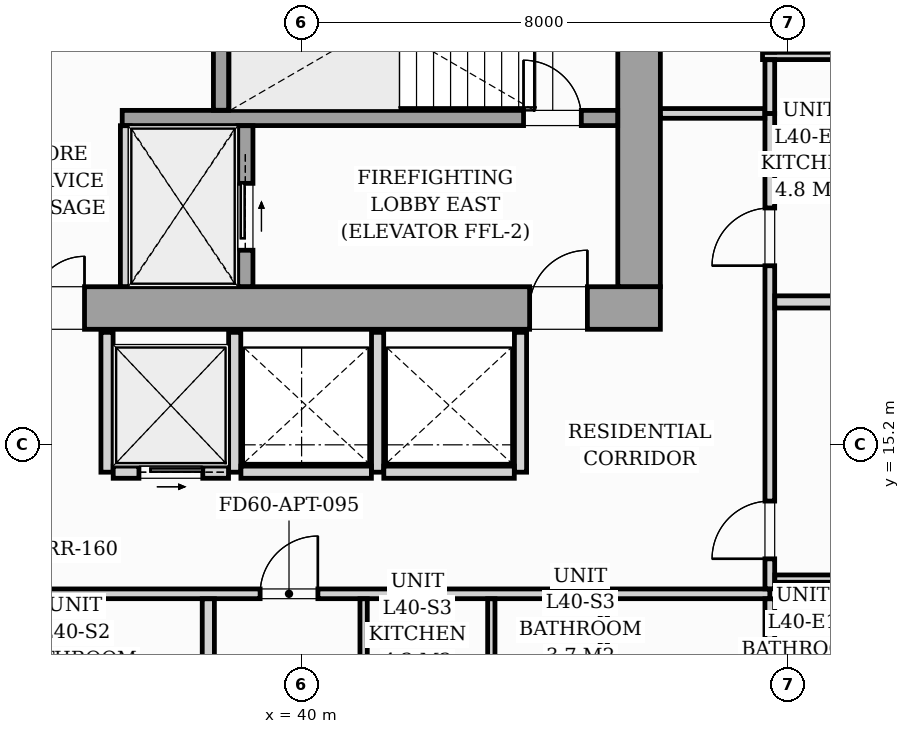
"""IFC4 building model, lengths in metres.
Left out: names, types, materials, properties, quantities, classifications, styles, units other than length and angle.
Written with IfcOpenShell. Run it as: python <this file> out.ifc"""

import sys

from ifc_helpers import new_model, si_unit, direction, frame, frame_2d, origin, origin_2d, place, context, subcontext, project, spatial, rectangle, i_section, extrude, source, transform, mapped, element, fill, save


model = new_model("IFC4")
c1 = context("Model", 3, precision=1e-05, world=origin(), true_north=direction((0.0, 1.0)))
c2 = subcontext(c1, "Body", "Model", "MODEL_VIEW")
j1 = project(units=[si_unit("LENGTHUNIT", "METRE"), si_unit("PLANEANGLEUNIT", "RADIAN")], contexts=[c1])
p1 = place(None, origin())
s1 = spatial("IfcSite", under=j1, at=p1, CompositionType="ELEMENT")
p2 = place(p1, origin())
s2 = spatial("IfcBuilding", under=s1, at=p2, CompositionType="ELEMENT")
p3 = place(p2, frame((0.0, 0.0, 140.6)))
s3 = spatial("IfcBuildingStorey", under=s2, at=p3, CompositionType="ELEMENT", Elevation=140.6)
m1 = source(origin(), c2, "Body", "SweptSolid", [
    extrude(i_section(OverallWidth=0.421, OverallDepth=0.465, WebThickness=0.045, FlangeThickness=0.073, FilletRadius=0.018, at=origin_2d()), origin(), (0.0, 0.0, 1.0), 3.196),
])
for number, where, z_axis, x_axis in (
    (1, (38.88, 17.4, 0.002), (0.0, 0.0, 1.0), (1.0, 0.0, 0.0)),
    (2, (45.6, 17.4, 0.002), (0.0, 0.0, 1.0), (1.0, 0.0, 0.0)),
):
    element("IfcColumn", number, at=place(p3, frame(where, z_axis=z_axis, x_axis=x_axis)), inside=s3, PredefinedType="PILASTER", context=c2, shape_type="MappedRepresentation", body=[
        mapped(m1, transform((0.0, 0.0, 0.0), scale=1.0)),
    ])
p4 = place(p3, frame((26.1, 17.45, 0.0), z_axis=(0.0, 0.0, 1.0), x_axis=(1.0, 0.0, 0.0)))
e3 = element("IfcWall", 3, at=p4, inside=s3, PredefinedType="SHEAR", context=c2, shape_type="SweptSolid", body=[
    extrude(rectangle(XDim=19.8, YDim=0.7, at=frame_2d((9.9, 0.0))), origin(), (0.0, 0.0, 1.0), 3.2),
])
p5 = place(p4, frame((1.05, 0.0, 0.0)))
e4 = element("IfcOpeningElement", 4, at=p5, cuts=e3, PredefinedType="OPENING", context=c2, shape_type="SweptSolid", body=[
    extrude(rectangle(XDim=0.95, YDim=2.06, at=frame_2d((0.475, 1.03))), frame((0.0, 0.36, 0.0), z_axis=(0.0, -1.0, 0.0), x_axis=(1.0, 0.0, 0.0)), (0.0, 0.0, 1.0), 0.72),
])
p6 = place(p4, frame((9.48, 0.0, 0.0)))
e5 = element("IfcOpeningElement", 5, at=p6, cuts=e3, PredefinedType="OPENING", context=c2, shape_type="SweptSolid", body=[
    extrude(rectangle(XDim=0.85, YDim=2.0, at=frame_2d((0.425, 1.0))), frame((0.0, 0.36, 0.0), z_axis=(0.0, -1.0, 0.0), x_axis=(1.0, 0.0, 0.0)), (0.0, 0.0, 1.0), 0.72),
])
p7 = place(p4, frame((17.65, 0.0, 0.0)))
e6 = element("IfcOpeningElement", 6, at=p7, cuts=e3, PredefinedType="OPENING", context=c2, shape_type="SweptSolid", body=[
    extrude(rectangle(XDim=0.95, YDim=2.06, at=frame_2d((0.475, 1.03))), frame((0.0, 0.36, 0.0), z_axis=(0.0, -1.0, 0.0), x_axis=(1.0, 0.0, 0.0)), (0.0, 0.0, 1.0), 0.72),
])
p8 = place(p3, frame((45.55, 17.802, 0.0), z_axis=(0.0, 0.0, 1.0), x_axis=(0.0, 1.0, 0.0)))
e7 = element("IfcWall", 7, at=p8, inside=s3, PredefinedType="SHEAR", context=c2, shape_type="SweptSolid", body=[
    extrude(rectangle(XDim=5.796, YDim=0.7, at=frame_2d((2.898, 0.0))), origin(), (0.0, 0.0, 1.0), 3.2),
])
p9 = place(p3, frame((37.05, 20.575, 0.0), z_axis=(0.0, 0.0, 1.0), x_axis=(1.0, 0.0, 0.0)))
e8 = element("IfcWall", 8, at=p9, inside=s3, PredefinedType="SOLIDWALL", context=c2, shape_type="SweptSolid", body=[
    extrude(rectangle(XDim=8.148, YDim=0.25, at=frame_2d((4.074, 0.0))), origin(), (0.0, 0.0, 1.0), 3.2),
])
p10 = place(p9, frame((6.6, 0.0, 0.0)))
e9 = element("IfcOpeningElement", 9, at=p10, cuts=e8, PredefinedType="OPENING", context=c2, shape_type="SweptSolid", body=[
    extrude(rectangle(XDim=0.95, YDim=2.06, at=frame_2d((0.475, 1.03))), frame((0.0, 0.135, 0.0), z_axis=(0.0, -1.0, 0.0), x_axis=(1.0, 0.0, 0.0)), (0.0, 0.0, 1.0), 0.27),
])
p11 = place(p3, frame((38.675, 20.702, 0.0), z_axis=(0.0, 0.0, 1.0), x_axis=(0.0, 1.0, 0.0)))
e10 = element("IfcWall", 10, at=p11, inside=s3, PredefinedType="SOLIDWALL", context=c2, shape_type="SweptSolid", body=[
    extrude(rectangle(XDim=2.896, YDim=0.25, at=frame_2d((1.448, 0.0))), origin(), (0.0, 0.0, 1.0), 3.2),
])
p12 = place(p3, frame((37.1, 17.802, 0.0), z_axis=(0.0, 0.0, 1.0), x_axis=(0.0, 1.0, 0.0)))
e11 = element("IfcWall", 11, at=p12, inside=s3, PredefinedType="PARTITIONING", context=c2, shape_type="SweptSolid", body=[
    extrude(rectangle(XDim=2.646, YDim=0.16, at=frame_2d((1.323, 0.0))), origin(), (0.0, 0.0, 1.0), 2.94),
])
p13 = place(p3, frame((39.075, 17.802, 0.0), z_axis=(0.0, 0.0, 1.0), x_axis=(0.0, 1.0, 0.0)))
e12 = element("IfcWall", 12, at=p13, inside=s3, PredefinedType="SOLIDWALL", context=c2, shape_type="SweptSolid", body=[
    extrude(rectangle(XDim=2.646, YDim=0.25, at=frame_2d((1.323, 0.0))), origin(), (0.0, 0.0, 1.0), 3.2),
])
p14 = place(p13, frame((0.598, 0.0, 0.0)))
e13 = element("IfcOpeningElement", 13, at=p14, cuts=e12, PredefinedType="OPENING", context=c2, shape_type="SweptSolid", body=[
    extrude(rectangle(XDim=1.1, YDim=2.08, at=frame_2d((0.55, 1.04))), frame((0.0, 0.135, 0.0), z_axis=(0.0, -1.0, 0.0), x_axis=(1.0, 0.0, 0.0)), (0.0, 0.0, 1.0), 0.27),
])
for number, where, z_axis, x_axis in (
    (14, (36.8, 14.75, 0.0), (0.0, 0.0, 1.0), (0.0, 1.0, 0.0)),
    (15, (38.9, 14.75, 0.0), (0.0, 0.0, 1.0), (0.0, 1.0, 0.0)),
):
    element("IfcWall", number, at=place(p3, frame(where, z_axis=z_axis, x_axis=x_axis)), inside=s3, PredefinedType="PARTITIONING", context=c2, shape_type="SweptSolid", body=[
        extrude(rectangle(XDim=2.3, YDim=0.2, at=frame_2d((1.15, 0.0))), origin(), (0.0, 0.0, 1.0), 2.94),
    ])
p15 = place(p3, frame((36.902, 14.75, 0.0), z_axis=(0.0, 0.0, 1.0), x_axis=(1.0, 0.0, 0.0)))
e16 = element("IfcWall", 16, at=p15, inside=s3, PredefinedType="PARTITIONING", context=c2, shape_type="SweptSolid", body=[
    extrude(rectangle(XDim=1.896, YDim=0.2, at=frame_2d((0.948, 0.0))), origin(), (0.0, 0.0, 1.0), 2.94),
])
p16 = place(p15, frame((0.423, 0.0, 0.0)))
e17 = element("IfcOpeningElement", 17, at=p16, cuts=e16, PredefinedType="OPENING", context=c2, shape_type="SweptSolid", body=[
    extrude(rectangle(XDim=1.05, YDim=2.08, at=frame_2d((0.525, 1.04))), frame((0.0, 0.11, 0.0), z_axis=(0.0, -1.0, 0.0), x_axis=(1.0, 0.0, 0.0)), (0.0, 0.0, 1.0), 0.22),
])
for number, where, z_axis, x_axis in (
    (18, (41.25, 14.75, 0.0), (0.0, 0.0, 1.0), (0.0, 1.0, 0.0)),
    (19, (43.6, 14.75, 0.0), (0.0, 0.0, 1.0), (0.0, 1.0, 0.0)),
):
    element("IfcWall", number, at=place(p3, frame(where, z_axis=z_axis, x_axis=x_axis)), inside=s3, PredefinedType="PARTITIONING", context=c2, shape_type="SweptSolid", body=[
        extrude(rectangle(XDim=2.3, YDim=0.2, at=frame_2d((1.15, 0.0))), origin(), (0.0, 0.0, 1.0), 2.94),
    ])
for number, where, z_axis, x_axis in (
    (20, (39.002, 14.75, 0.0), (0.0, 0.0, 1.0), (1.0, 0.0, 0.0)),
    (21, (41.352, 14.75, 0.0), (0.0, 0.0, 1.0), (1.0, 0.0, 0.0)),
):
    element("IfcWall", number, at=place(p3, frame(where, z_axis=z_axis, x_axis=x_axis)), inside=s3, PredefinedType="PARTITIONING", context=c2, shape_type="SweptSolid", body=[
        extrude(rectangle(XDim=2.146, YDim=0.2, at=frame_2d((1.073, 0.0))), origin(), (0.0, 0.0, 1.0), 2.94),
    ])
p17 = place(p3, frame((22.05, 12.75, 0.0), z_axis=(0.0, 0.0, 1.0), x_axis=(1.0, 0.0, 0.0)))
e22 = element("IfcWall", 22, at=p17, inside=s3, PredefinedType="PARTITIONING", context=c2, shape_type="SweptSolid", body=[
    extrude(rectangle(XDim=25.65, YDim=0.16, at=frame_2d((12.825, 0.0))), origin(), (0.0, 0.0, 1.0), 2.94),
])
p18 = place(p17, frame((1.312, 0.0, 0.0)))
e23 = element("IfcOpeningElement", 23, at=p18, cuts=e22, PredefinedType="OPENING", context=c2, shape_type="SweptSolid", body=[
    extrude(rectangle(XDim=0.95, YDim=2.06, at=frame_2d((0.475, 1.03))), frame((0.0, 0.09, 0.0), z_axis=(0.0, -1.0, 0.0), x_axis=(1.0, 0.0, 0.0)), (0.0, 0.0, 1.0), 0.18),
])
p19 = place(p17, frame((8.281, 0.0, 0.0)))
e24 = element("IfcOpeningElement", 24, at=p19, cuts=e22, PredefinedType="OPENING", context=c2, shape_type="SweptSolid", body=[
    extrude(rectangle(XDim=0.95, YDim=2.06, at=frame_2d((0.475, 1.03))), frame((0.0, 0.09, 0.0), z_axis=(0.0, -1.0, 0.0), x_axis=(1.0, 0.0, 0.0)), (0.0, 0.0, 1.0), 0.18),
])
p20 = place(p17, frame((17.268, 0.0, 0.0)))
e25 = element("IfcOpeningElement", 25, at=p20, cuts=e22, PredefinedType="OPENING", context=c2, shape_type="SweptSolid", body=[
    extrude(rectangle(XDim=0.95, YDim=2.06, at=frame_2d((0.475, 1.03))), frame((0.0, 0.09, 0.0), z_axis=(0.0, -1.0, 0.0), x_axis=(1.0, 0.0, 0.0)), (0.0, 0.0, 1.0), 0.18),
])
p21 = place(p3, frame((47.7, 5.783, 0.0), z_axis=(0.0, 0.0, 1.0), x_axis=(0.0, 1.0, 0.0)))
e26 = element("IfcWall", 26, at=p21, inside=s3, PredefinedType="PARTITIONING", context=c2, shape_type="SweptSolid", body=[
    extrude(rectangle(XDim=6.885, YDim=0.16, at=frame_2d((3.442, 0.0))), origin(), (0.0, 0.0, 1.0), 2.94),
])
p22 = place(p3, frame((47.7, 12.832, 0.0), z_axis=(0.0, 0.0, 1.0), x_axis=(0.0, 1.0, 0.0)))
e27 = element("IfcWall", 27, at=p22, inside=s3, PredefinedType="PARTITIONING", context=c2, shape_type="SweptSolid", body=[
    extrude(rectangle(XDim=7.818, YDim=0.16, at=frame_2d((3.909, 0.0))), origin(), (0.0, 0.0, 1.0), 2.94),
])
p23 = place(p22, frame((0.493, 0.0, 0.0)))
e28 = element("IfcOpeningElement", 28, at=p23, cuts=e27, PredefinedType="OPENING", context=c2, shape_type="SweptSolid", body=[
    extrude(rectangle(XDim=0.95, YDim=2.06, at=frame_2d((0.475, 1.03))), frame((0.0, 0.09, 0.0), z_axis=(0.0, -1.0, 0.0), x_axis=(1.0, 0.0, 0.0)), (0.0, 0.0, 1.0), 0.18),
])
p24 = place(p22, frame((5.313, 0.0, 0.0)))
e29 = element("IfcOpeningElement", 29, at=p24, cuts=e27, PredefinedType="OPENING", context=c2, shape_type="SweptSolid", body=[
    extrude(rectangle(XDim=0.95, YDim=2.06, at=frame_2d((0.475, 1.03))), frame((0.0, 0.09, 0.0), z_axis=(0.0, -1.0, 0.0), x_axis=(1.0, 0.0, 0.0)), (0.0, 0.0, 1.0), 0.18),
])
p25 = place(p3, frame((45.902, 20.65, 0.0), z_axis=(0.0, 0.0, 1.0), x_axis=(1.0, 0.0, 0.0)))
e30 = element("IfcWall", 30, at=p25, inside=s3, PredefinedType="PARTITIONING", context=c2, shape_type="SweptSolid", body=[
    extrude(rectangle(XDim=1.716, YDim=0.16, at=frame_2d((0.858, 0.0))), origin(), (0.0, 0.0, 1.0), 2.94),
])
p26 = place(p3, frame((38.466, 6.49, 0.0), z_axis=(0.0, 0.0, 1.0), x_axis=(0.0, 1.0, 0.0)))
e31 = element("IfcWall", 31, at=p26, inside=s3, PredefinedType="PARTITIONING", context=c2, shape_type="SweptSolid", body=[
    extrude(rectangle(XDim=6.178, YDim=0.2, at=frame_2d((3.089, 0.0))), origin(), (0.0, 0.0, 1.0), 2.94),
])
p27 = place(p3, frame((44.97, 6.046, 0.0), z_axis=(0.0, 0.0, 1.0), x_axis=(0.0, 1.0, 0.0)))
e32 = element("IfcWall", 32, at=p27, inside=s3, PredefinedType="PARTITIONING", context=c2, shape_type="SweptSolid", body=[
    extrude(rectangle(XDim=6.622, YDim=0.12, at=frame_2d((3.311, 0.0))), origin(), (0.0, 0.0, 1.0), 2.94),
])
p28 = place(p27, frame((3.354, 0.0, 0.0)))
e33 = element("IfcOpeningElement", 33, at=p28, cuts=e32, PredefinedType="OPENING", context=c2, shape_type="SweptSolid", body=[
    extrude(rectangle(XDim=0.9, YDim=2.05, at=frame_2d((0.45, 1.025))), frame((0.0, 0.07, 0.0), z_axis=(0.0, -1.0, 0.0), x_axis=(1.0, 0.0, 0.0)), (0.0, 0.0, 1.0), 0.14),
])
for number, where, z_axis, x_axis in (
    (34, (43.12, 10.562, 0.0), (0.0, 0.0, 1.0), (0.0, 1.0, 0.0)),
    (35, (41.02, 10.562, 0.0), (0.0, 0.0, 1.0), (0.0, 1.0, 0.0)),
):
    element("IfcWall", number, at=place(p3, frame(where, z_axis=z_axis, x_axis=x_axis)), inside=s3, PredefinedType="PARTITIONING", context=c2, shape_type="SweptSolid", body=[
        extrude(rectangle(XDim=2.106, YDim=0.12, at=frame_2d((1.053, 0.0))), origin(), (0.0, 0.0, 1.0), 2.94),
    ])
p29 = place(p3, frame((47.782, 17.55, 0.0), z_axis=(0.0, 0.0, 1.0), x_axis=(1.0, 0.0, 0.0)))
e36 = element("IfcWall", 36, at=p29, inside=s3, PredefinedType="PARTITIONING", context=c2, shape_type="SweptSolid", body=[
    extrude(rectangle(XDim=11.934, YDim=0.2, at=frame_2d((5.967, 0.0))), origin(), (0.0, 0.0, 1.0), 2.94),
])
p30 = place(p3, frame((47.782, 13.0, 0.0), z_axis=(0.0, 0.0, 1.0), x_axis=(1.0, 0.0, 0.0)))
e37 = element("IfcWall", 37, at=p30, inside=s3, PredefinedType="PARTITIONING", context=c2, shape_type="SweptSolid", body=[
    extrude(rectangle(XDim=2.256, YDim=0.12, at=frame_2d((1.128, 0.0))), origin(), (0.0, 0.0, 1.0), 2.94),
])
p31 = place(p3, frame((47.58, 21.595, 0.0), z_axis=(0.0, 0.0, 1.0), x_axis=(1.0, 0.0, 0.0)))
e38 = element("IfcWall", 38, at=p31, inside=s3, PredefinedType="PARTITIONING", context=c2, shape_type="SweptSolid", body=[
    extrude(rectangle(XDim=2.458, YDim=0.12, at=frame_2d((1.229, 0.0))), origin(), (0.0, 0.0, 1.0), 2.94),
])
p32 = place(p3, frame((47.782, 19.42, 0.0), z_axis=(0.0, 0.0, 1.0), x_axis=(1.0, 0.0, 0.0)))
e39 = element("IfcWall", 39, at=p32, inside=s3, PredefinedType="PARTITIONING", context=c2, shape_type="SweptSolid", body=[
    extrude(rectangle(XDim=2.256, YDim=0.12, at=frame_2d((1.128, 0.0))), origin(), (0.0, 0.0, 1.0), 2.94),
])
p33 = place(p3, frame((47.7, 20.65, 0.0), z_axis=(0.0, 0.0, 1.0), x_axis=(0.0, 1.0, 0.0)))
e40 = element("IfcWall", 40, at=p33, inside=s3, PredefinedType="PARTITIONING", context=c2, shape_type="SweptSolid", body=[
    extrude(rectangle(XDim=0.883, YDim=0.16, at=frame_2d((0.441, 0.0))), origin(), (0.0, 0.0, 1.0), 2.94),
])
m2 = source(origin(), c2, "Body", "SweptSolid", [
    extrude(rectangle(XDim=0.85, YDim=2.0, at=frame_2d((0.425, 1.0))), frame((0.0, 0.025, 0.0), z_axis=(0.0, -1.0, 0.0), x_axis=(1.0, 0.0, 0.0)), (0.0, 0.0, 1.0), 0.05),
])
p34 = place(p6, origin())
e41 = element("IfcDoor", 41, at=p34, inside=s3, OperationType="SINGLE_SWING_RIGHT", PredefinedType="DOOR", context=c2, shape_type="MappedRepresentation", body=[
    mapped(m2, transform((0.0, 0.0, 0.0), scale=1.0)),
])
fill(e5, e41)
m3 = source(origin(), c2, "Body", "SweptSolid", [
    extrude(rectangle(XDim=0.95, YDim=2.06, at=frame_2d((0.475, 1.03))), frame((0.0, 0.025, 0.0), z_axis=(0.0, -1.0, 0.0), x_axis=(1.0, 0.0, 0.0)), (0.0, 0.0, 1.0), 0.05),
])
p35 = place(p7, origin())
e42 = element("IfcDoor", 42, at=p35, inside=s3, OperationType="SINGLE_SWING_RIGHT", PredefinedType="DOOR", context=c2, shape_type="MappedRepresentation", body=[
    mapped(m3, transform((0.0, 0.0, 0.0), scale=1.0)),
])
fill(e6, e42)
p36 = place(p10, origin())
e43 = element("IfcDoor", 43, at=p36, inside=s3, OperationType="SINGLE_SWING_LEFT", PredefinedType="DOOR", context=c2, shape_type="MappedRepresentation", body=[
    mapped(m3, transform((0.0, 0.0, 0.0), scale=1.0)),
])
fill(e9, e43)
m4 = source(origin(), c2, "Body", "SweptSolid", [
    extrude(rectangle(XDim=1.1, YDim=2.08, at=frame_2d((0.55, 1.04))), frame((0.0, 0.025, 0.0), z_axis=(0.0, -1.0, 0.0), x_axis=(1.0, 0.0, 0.0)), (0.0, 0.0, 1.0), 0.05),
])
p37 = place(p14, origin())
e44 = element("IfcDoor", 44, at=p37, inside=s3, OperationType="SLIDING_TO_RIGHT", PredefinedType="DOOR", context=c2, shape_type="MappedRepresentation", body=[
    mapped(m4, transform((0.0, 0.0, 0.0), scale=1.0)),
])
fill(e13, e44)
m5 = source(origin(), c2, "Body", "SweptSolid", [
    extrude(rectangle(XDim=1.05, YDim=2.08, at=frame_2d((0.525, 1.04))), frame((0.0, 0.025, 0.0), z_axis=(0.0, -1.0, 0.0), x_axis=(1.0, 0.0, 0.0)), (0.0, 0.0, 1.0), 0.05),
])
p38 = place(p16, origin())
e45 = element("IfcDoor", 45, at=p38, inside=s3, OperationType="SLIDING_TO_RIGHT", PredefinedType="DOOR", context=c2, shape_type="MappedRepresentation", body=[
    mapped(m5, transform((0.0, 0.0, 0.0), scale=1.0)),
])
fill(e17, e45)
m6 = source(origin(), c2, "Body", "SweptSolid", [
    extrude(rectangle(XDim=0.95, YDim=2.06, at=frame_2d((0.475, 1.03))), frame((0.0, 0.025, 0.0), z_axis=(0.0, -1.0, 0.0), x_axis=(1.0, 0.0, 0.0)), (0.0, 0.0, 1.0), 0.05),
])
p39 = place(p20, origin())
e46 = element("IfcDoor", 46, at=p39, inside=s3, OperationType="SINGLE_SWING_RIGHT", PredefinedType="DOOR", context=c2, shape_type="MappedRepresentation", body=[
    mapped(m6, transform((0.0, 0.0, 0.0), scale=1.0)),
])
fill(e25, e46)
p40 = place(p23, origin())
e47 = element("IfcDoor", 47, at=p40, inside=s3, OperationType="SINGLE_SWING_LEFT", PredefinedType="DOOR", context=c2, shape_type="MappedRepresentation", body=[
    mapped(m6, transform((0.0, 0.0, 0.0), scale=1.0)),
])
fill(e28, e47)
p41 = place(p24, origin())
e48 = element("IfcDoor", 48, at=p41, inside=s3, OperationType="SINGLE_SWING_LEFT", PredefinedType="DOOR", context=c2, shape_type="MappedRepresentation", body=[
    mapped(m6, transform((0.0, 0.0, 0.0), scale=1.0)),
])
fill(e29, e48)
save(model, sys.argv[1])
